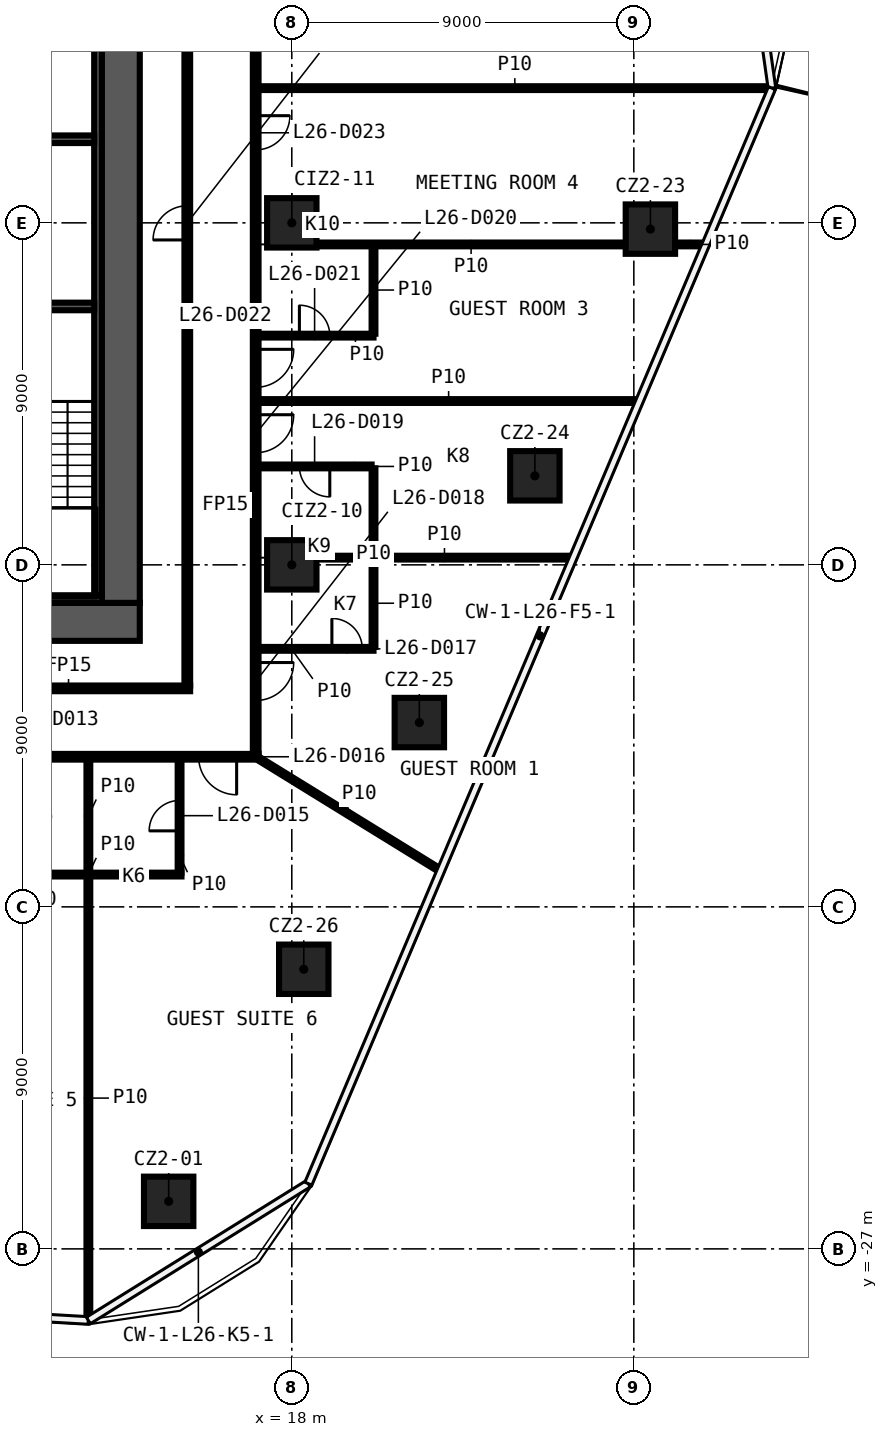
"""IFC4 building model, lengths in metres.
Left out: names, types, materials, properties, quantities, classifications, styles, units other than length and angle.
Written with IfcOpenShell. Run it as: python <this file> out.ifc"""

import sys

from ifc_helpers import new_model, si_unit, direction, frame, frame_2d, origin, origin_2d, place, context, subcontext, project, spatial, rectangle, extrude, element, fill, save


model = new_model("IFC4")
c1 = context("Model", 3, precision=1e-05, world=origin(), true_north=direction((0.0, 1.0)))
c2 = subcontext(c1, "Body", "Model", "MODEL_VIEW")
j1 = project(units=[si_unit("LENGTHUNIT", "METRE"), si_unit("PLANEANGLEUNIT", "RADIAN")], contexts=[c1])
p1 = place(None, origin())
s1 = spatial("IfcSite", under=j1, at=p1, CompositionType="ELEMENT")
p2 = place(p1, origin())
s2 = spatial("IfcBuilding", under=s1, at=p2, CompositionType="ELEMENT")
p3 = place(p2, frame((0.0, 0.0, 121.1)))
s3 = spatial("IfcBuildingStorey", under=s2, at=p3, CompositionType="ELEMENT", Elevation=121.1)
for number, where, z_axis, x_axis in (
    (1, (14.76, -25.749, 0.0), (0.0, 0.0, 1.0), (1.0, 0.0, 0.0)),
    (2, (27.436, -0.165, 0.0), (0.0, 0.0, 1.0), (1.0, 0.0, 0.0)),
    (3, (24.396, -6.657, 0.0), (0.0, 0.0, 1.0), (1.0, 0.0, 0.0)),
    (4, (21.356, -13.15, 0.0), (0.0, 0.0, 1.0), (1.0, 0.0, 0.0)),
    (5, (18.315, -19.642, 0.0), (0.0, 0.0, 1.0), (1.0, 0.0, 0.0)),
    (6, (18.0, -9.0, 0.0), (0.0, 0.0, 1.0), (1.0, 0.0, 0.0)),
    (7, (18.0, 0.0, 0.0), (0.0, 0.0, 1.0), (1.0, 0.0, 0.0)),
):
    element("IfcColumn", number, at=place(p3, frame(where, z_axis=z_axis, x_axis=x_axis)), inside=s3, PredefinedType="COLUMN", context=c2, shape_type="SweptSolid", body=[
        extrude(rectangle(XDim=1.3, YDim=1.3, at=origin_2d()), origin(), (0.0, 0.0, 1.0), 3.3),
    ])
p4 = place(p3, frame((10.197, -17.15, 0.0), z_axis=(0.0, 0.0, 1.0), x_axis=(1.0, 0.0, 0.0)))
e8 = element("IfcWall", 8, at=p4, inside=s3, PredefinedType="PARTITIONING", context=c2, shape_type="SweptSolid", body=[
    extrude(rectangle(XDim=4.9, YDim=0.1, at=frame_2d((2.45, 0.0))), origin(), (0.0, 0.0, 1.0), 3.3),
])
p5 = place(p3, frame((17.125, -14.05, 0.0), z_axis=(0.0, 0.0, 1.0), x_axis=(-1.0, 0.0, 0.0)))
e9 = element("IfcWall", 9, at=p5, inside=s3, PredefinedType="PARTITIONING", context=c2, shape_type="SweptSolid", body=[
    extrude(rectangle(XDim=34.25, YDim=0.15, at=frame_2d((17.125, 0.0))), origin(), (0.0, 0.0, 1.0), 3.3),
])
p6 = place(p5, frame((32.089, 0.0, 0.0)))
e10 = element("IfcOpeningElement", 10, at=p6, cuts=e9, PredefinedType="OPENING", context=c2, shape_type="SweptSolid", body=[
    extrude(rectangle(XDim=0.9, YDim=2.1, at=frame_2d((0.45, 1.05))), frame((0.0, 0.085, 0.0), z_axis=(0.0, -1.0, 0.0), x_axis=(1.0, 0.0, 0.0)), (0.0, 0.0, 1.0), 0.17),
])
p7 = place(p5, frame((25.666, 0.0, 0.0)))
e11 = element("IfcOpeningElement", 11, at=p7, cuts=e9, PredefinedType="OPENING", context=c2, shape_type="SweptSolid", body=[
    extrude(rectangle(XDim=1.0, YDim=2.1, at=frame_2d((0.5, 1.05))), frame((0.0, 0.085, 0.0), z_axis=(0.0, -1.0, 0.0), x_axis=(1.0, 0.0, 0.0)), (0.0, 0.0, 1.0), 0.17),
])
p8 = place(p5, frame((18.714, 0.0, 0.0)))
e12 = element("IfcOpeningElement", 12, at=p8, cuts=e9, PredefinedType="OPENING", context=c2, shape_type="SweptSolid", body=[
    extrude(rectangle(XDim=1.0, YDim=2.1, at=frame_2d((0.5, 1.05))), frame((0.0, 0.085, 0.0), z_axis=(0.0, -1.0, 0.0), x_axis=(1.0, 0.0, 0.0)), (0.0, 0.0, 1.0), 0.17),
])
p9 = place(p5, frame((16.558, 0.0, 0.0)))
e13 = element("IfcOpeningElement", 13, at=p9, cuts=e9, PredefinedType="OPENING", context=c2, shape_type="SweptSolid", body=[
    extrude(rectangle(XDim=1.0, YDim=2.1, at=frame_2d((0.5, 1.05))), frame((0.0, 0.085, 0.0), z_axis=(0.0, -1.0, 0.0), x_axis=(1.0, 0.0, 0.0)), (0.0, 0.0, 1.0), 0.17),
])
p10 = place(p5, frame((9.602, 0.0, 0.0)))
e14 = element("IfcOpeningElement", 14, at=p10, cuts=e9, PredefinedType="OPENING", context=c2, shape_type="SweptSolid", body=[
    extrude(rectangle(XDim=1.0, YDim=2.1, at=frame_2d((0.5, 1.05))), frame((0.0, 0.085, 0.0), z_axis=(0.0, -1.0, 0.0), x_axis=(1.0, 0.0, 0.0)), (0.0, 0.0, 1.0), 0.17),
])
p11 = place(p5, frame((7.451, 0.0, 0.0)))
e15 = element("IfcOpeningElement", 15, at=p11, cuts=e9, PredefinedType="OPENING", context=c2, shape_type="SweptSolid", body=[
    extrude(rectangle(XDim=1.0, YDim=2.1, at=frame_2d((0.5, 1.05))), frame((0.0, 0.085, 0.0), z_axis=(0.0, -1.0, 0.0), x_axis=(1.0, 0.0, 0.0)), (0.0, 0.0, 1.0), 0.17),
])
p12 = place(p5, frame((0.576, 0.0, 0.0)))
e16 = element("IfcOpeningElement", 16, at=p12, cuts=e9, PredefinedType="OPENING", context=c2, shape_type="SweptSolid", body=[
    extrude(rectangle(XDim=1.0, YDim=2.1, at=frame_2d((0.5, 1.05))), frame((0.0, 0.085, 0.0), z_axis=(0.0, -1.0, 0.0), x_axis=(1.0, 0.0, 0.0)), (0.0, 0.0, 1.0), 0.17),
])
p13 = place(p3, frame((8.925, -12.25, 0.0), z_axis=(0.0, 0.0, 1.0), x_axis=(1.0, 0.0, 0.0)))
e17 = element("IfcWall", 17, at=p13, inside=s3, PredefinedType="PARTITIONING", context=c2, shape_type="SweptSolid", body=[
    extrude(rectangle(XDim=6.4, YDim=0.15, at=frame_2d((3.2, 0.0))), origin(), (0.0, 0.0, 1.0), 3.3),
])
p14 = place(p3, frame((17.125, -11.21, 0.0), z_axis=(0.0, 0.0, 1.0), x_axis=(1.0, 0.0, 0.0)))
e18 = element("IfcWall", 18, at=p14, inside=s3, PredefinedType="PARTITIONING", context=c2, shape_type="SweptSolid", body=[
    extrude(rectangle(XDim=3.025, YDim=0.1, at=frame_2d((1.512, 0.0))), origin(), (0.0, 0.0, 1.0), 3.3),
])
p15 = place(p14, frame((1.93, 0.0, 0.0)))
e19 = element("IfcOpeningElement", 19, at=p15, cuts=e18, PredefinedType="OPENING", context=c2, shape_type="SweptSolid", body=[
    extrude(rectangle(XDim=0.8, YDim=2.1, at=frame_2d((0.4, 1.05))), frame((0.0, 0.06, 0.0), z_axis=(0.0, -1.0, 0.0), x_axis=(1.0, 0.0, 0.0)), (0.0, 0.0, 1.0), 0.12),
])
p16 = place(p3, frame((18.65, -8.81, 0.0), z_axis=(0.0, 0.0, 1.0), x_axis=(1.0, 0.0, 0.0)))
e20 = element("IfcWall", 20, at=p16, inside=s3, PredefinedType="PARTITIONING", context=c2, shape_type="SweptSolid", body=[
    extrude(rectangle(XDim=6.735, YDim=0.1, at=frame_2d((3.367, 0.0))), origin(), (0.0, 0.0, 1.0), 3.3),
])
p17 = place(p3, frame((20.1, -6.41, 0.0), z_axis=(0.0, 0.0, 1.0), x_axis=(-1.0, 0.0, 0.0)))
e21 = element("IfcWall", 21, at=p17, inside=s3, PredefinedType="PARTITIONING", context=c2, shape_type="SweptSolid", body=[
    extrude(rectangle(XDim=2.975, YDim=0.1, at=frame_2d((1.488, 0.0))), origin(), (0.0, 0.0, 1.0), 3.3),
])
p18 = place(p17, frame((1.1, 0.0, 0.0)))
e22 = element("IfcOpeningElement", 22, at=p18, cuts=e21, PredefinedType="OPENING", context=c2, shape_type="SweptSolid", body=[
    extrude(rectangle(XDim=0.8, YDim=2.1, at=frame_2d((0.4, 1.05))), frame((0.0, 0.06, 0.0), z_axis=(0.0, -1.0, 0.0), x_axis=(1.0, 0.0, 0.0)), (0.0, 0.0, 1.0), 0.12),
])
p19 = place(p3, frame((17.125, -4.689, 0.0), z_axis=(0.0, 0.0, 1.0), x_axis=(1.0, 0.0, 0.0)))
e23 = element("IfcWall", 23, at=p19, inside=s3, PredefinedType="PARTITIONING", context=c2, shape_type="SweptSolid", body=[
    extrude(rectangle(XDim=10.003, YDim=0.1, at=frame_2d((5.001, 0.0))), origin(), (0.0, 0.0, 1.0), 3.3),
])
p20 = place(p3, frame((17.125, -2.968, 0.0), z_axis=(0.0, 0.0, 1.0), x_axis=(1.0, 0.0, 0.0)))
e24 = element("IfcWall", 24, at=p20, inside=s3, PredefinedType="PARTITIONING", context=c2, shape_type="SweptSolid", body=[
    extrude(rectangle(XDim=3.025, YDim=0.1, at=frame_2d((1.512, 0.0))), origin(), (0.0, 0.0, 1.0), 3.3),
])
p21 = place(p20, frame((1.075, 0.0, 0.0)))
e25 = element("IfcOpeningElement", 25, at=p21, cuts=e24, PredefinedType="OPENING", context=c2, shape_type="SweptSolid", body=[
    extrude(rectangle(XDim=0.8, YDim=2.1, at=frame_2d((0.4, 1.05))), frame((0.0, 0.06, 0.0), z_axis=(0.0, -1.0, 0.0), x_axis=(1.0, 0.0, 0.0)), (0.0, 0.0, 1.0), 0.12),
])
p22 = place(p3, frame((18.65, -0.568, 0.0), z_axis=(0.0, 0.0, 1.0), x_axis=(1.0, 0.0, 0.0)))
e26 = element("IfcWall", 26, at=p22, inside=s3, PredefinedType="PARTITIONING", context=c2, shape_type="SweptSolid", body=[
    extrude(rectangle(XDim=8.136, YDim=0.1, at=frame_2d((4.068, 0.0))), origin(), (0.0, 0.0, 1.0), 3.3),
])
p23 = place(p3, frame((28.086, -0.568, 0.0), z_axis=(0.0, 0.0, 1.0), x_axis=(1.0, 0.0, 0.0)))
e27 = element("IfcWall", 27, at=p23, inside=s3, PredefinedType="PARTITIONING", context=c2, shape_type="SweptSolid", body=[
    extrude(rectangle(XDim=0.786, YDim=0.1, at=frame_2d((0.393, 0.0))), origin(), (0.0, 0.0, 1.0), 3.3),
])
p24 = place(p3, frame((17.125, 3.545, 0.0), z_axis=(0.0, 0.0, 1.0), x_axis=(1.0, 0.0, 0.0)))
e28 = element("IfcWall", 28, at=p24, inside=s3, PredefinedType="PARTITIONING", context=c2, shape_type="SweptSolid", body=[
    extrude(rectangle(XDim=13.487, YDim=0.1, at=frame_2d((6.743, 0.0))), origin(), (0.0, 0.0, 1.0), 3.3),
])
p25 = place(p3, frame((20.15, -11.16, 0.0), z_axis=(0.0, 0.0, 1.0), x_axis=(0.0, 1.0, 0.0)))
e29 = element("IfcWall", 29, at=p25, inside=s3, PredefinedType="PARTITIONING", context=c2, shape_type="SweptSolid", body=[
    extrude(rectangle(XDim=2.3, YDim=0.1, at=frame_2d((1.15, 0.0))), origin(), (0.0, 0.0, 1.0), 3.3),
])
p26 = place(p3, frame((20.15, -8.76, 0.0), z_axis=(0.0, 0.0, 1.0), x_axis=(0.0, 1.0, 0.0)))
e30 = element("IfcWall", 30, at=p26, inside=s3, PredefinedType="PARTITIONING", context=c2, shape_type="SweptSolid", body=[
    extrude(rectangle(XDim=2.3, YDim=0.1, at=frame_2d((1.15, 0.0))), origin(), (0.0, 0.0, 1.0), 3.3),
])
p27 = place(p3, frame((20.15, -2.918, 0.0), z_axis=(0.0, 0.0, 1.0), x_axis=(0.0, 1.0, 0.0)))
e31 = element("IfcWall", 31, at=p27, inside=s3, PredefinedType="PARTITIONING", context=c2, shape_type="SweptSolid", body=[
    extrude(rectangle(XDim=2.3, YDim=0.1, at=frame_2d((1.15, 0.0))), origin(), (0.0, 0.0, 1.0), 3.3),
])
p28 = place(p3, frame((17.05, 13.975, 0.0), z_axis=(0.0, 0.0, 1.0), x_axis=(0.0, -1.0, 0.0)))
e32 = element("IfcWall", 32, at=p28, inside=s3, PredefinedType="PARTITIONING", context=c2, shape_type="SweptSolid", body=[
    extrude(rectangle(XDim=27.95, YDim=0.15, at=frame_2d((13.975, 0.0))), origin(), (0.0, 0.0, 1.0), 3.3),
])
p29 = place(p28, frame((25.545, 0.0, 0.0)))
e33 = element("IfcOpeningElement", 33, at=p29, cuts=e32, PredefinedType="OPENING", context=c2, shape_type="SweptSolid", body=[
    extrude(rectangle(XDim=1.0, YDim=2.1, at=frame_2d((0.5, 1.05))), frame((0.0, 0.085, 0.0), z_axis=(0.0, -1.0, 0.0), x_axis=(1.0, 0.0, 0.0)), (0.0, 0.0, 1.0), 0.17),
])
p30 = place(p28, frame((19.024, 0.0, 0.0)))
e34 = element("IfcOpeningElement", 34, at=p30, cuts=e32, PredefinedType="OPENING", context=c2, shape_type="SweptSolid", body=[
    extrude(rectangle(XDim=1.0, YDim=2.1, at=frame_2d((0.5, 1.05))), frame((0.0, 0.085, 0.0), z_axis=(0.0, -1.0, 0.0), x_axis=(1.0, 0.0, 0.0)), (0.0, 0.0, 1.0), 0.17),
])
p31 = place(p28, frame((17.303, 0.0, 0.0)))
e35 = element("IfcOpeningElement", 35, at=p31, cuts=e32, PredefinedType="OPENING", context=c2, shape_type="SweptSolid", body=[
    extrude(rectangle(XDim=1.0, YDim=2.1, at=frame_2d((0.5, 1.05))), frame((0.0, 0.085, 0.0), z_axis=(0.0, -1.0, 0.0), x_axis=(1.0, 0.0, 0.0)), (0.0, 0.0, 1.0), 0.17),
])
p32 = place(p28, frame((11.155, 0.0, 0.0)))
e36 = element("IfcOpeningElement", 36, at=p32, cuts=e32, PredefinedType="OPENING", context=c2, shape_type="SweptSolid", body=[
    extrude(rectangle(XDim=0.9, YDim=2.1, at=frame_2d((0.45, 1.05))), frame((0.0, 0.085, 0.0), z_axis=(0.0, -1.0, 0.0), x_axis=(1.0, 0.0, 0.0)), (0.0, 0.0, 1.0), 0.17),
])
p33 = place(p28, frame((7.145, 0.0, 0.0)))
e37 = element("IfcOpeningElement", 37, at=p33, cuts=e32, PredefinedType="OPENING", context=c2, shape_type="SweptSolid", body=[
    extrude(rectangle(XDim=0.9, YDim=2.1, at=frame_2d((0.45, 1.05))), frame((0.0, 0.085, 0.0), z_axis=(0.0, -1.0, 0.0), x_axis=(1.0, 0.0, 0.0)), (0.0, 0.0, 1.0), 0.17),
])
p34 = place(p28, frame((2.168, 0.0, 0.0)))
e38 = element("IfcOpeningElement", 38, at=p34, cuts=e32, PredefinedType="OPENING", context=c2, shape_type="SweptSolid", body=[
    extrude(rectangle(XDim=0.9, YDim=2.1, at=frame_2d((0.45, 1.05))), frame((0.0, 0.085, 0.0), z_axis=(0.0, -1.0, 0.0), x_axis=(1.0, 0.0, 0.0)), (0.0, 0.0, 1.0), 0.17),
])
p35 = place(p3, frame((15.25, -12.175, 0.0), z_axis=(0.0, 0.0, 1.0), x_axis=(0.0, 1.0, 0.0)))
e39 = element("IfcWall", 39, at=p35, inside=s3, PredefinedType="PARTITIONING", context=c2, shape_type="SweptSolid", body=[
    extrude(rectangle(XDim=24.35, YDim=0.15, at=frame_2d((12.175, 0.0))), origin(), (0.0, 0.0, 1.0), 3.3),
])
p36 = place(p35, frame((11.725, 0.0, 0.0)))
e40 = element("IfcOpeningElement", 40, at=p36, cuts=e39, PredefinedType="OPENING", context=c2, shape_type="SweptSolid", body=[
    extrude(rectangle(XDim=0.9, YDim=2.1, at=frame_2d((0.45, 1.05))), frame((0.0, 0.085, 0.0), z_axis=(0.0, -1.0, 0.0), x_axis=(1.0, 0.0, 0.0)), (0.0, 0.0, 1.0), 0.17),
])
p37 = place(p3, frame((15.047, -17.1, 0.0), z_axis=(0.0, 0.0, 1.0), x_axis=(0.0, 1.0, 0.0)))
e41 = element("IfcWall", 41, at=p37, inside=s3, PredefinedType="PARTITIONING", context=c2, shape_type="SweptSolid", body=[
    extrude(rectangle(XDim=2.975, YDim=0.1, at=frame_2d((1.488, 0.0))), origin(), (0.0, 0.0, 1.0), 3.3),
])
p38 = place(p37, frame((1.1, 0.0, 0.0)))
e42 = element("IfcOpeningElement", 42, at=p38, cuts=e41, PredefinedType="OPENING", context=c2, shape_type="SweptSolid", body=[
    extrude(rectangle(XDim=0.8, YDim=2.1, at=frame_2d((0.4, 1.05))), frame((0.0, 0.06, 0.0), z_axis=(0.0, -1.0, 0.0), x_axis=(1.0, 0.0, 0.0)), (0.0, 0.0, 1.0), 0.12),
])
p39 = place(p3, frame((12.647, -28.864, 0.0), z_axis=(0.0, 0.0, 1.0), x_axis=(0.0, 1.0, 0.0)))
e43 = element("IfcWall", 43, at=p39, inside=s3, PredefinedType="PARTITIONING", context=c2, shape_type="SweptSolid", body=[
    extrude(rectangle(XDim=11.664, YDim=0.1, at=frame_2d((5.832, 0.0))), origin(), (0.0, 0.0, 1.0), 3.3),
])
p40 = place(p3, frame((12.647, -17.1, 0.0), z_axis=(0.0, 0.0, 1.0), x_axis=(0.0, 1.0, 0.0)))
e44 = element("IfcWall", 44, at=p40, inside=s3, PredefinedType="PARTITIONING", context=c2, shape_type="SweptSolid", body=[
    extrude(rectangle(XDim=2.975, YDim=0.1, at=frame_2d((1.488, 0.0))), origin(), (0.0, 0.0, 1.0), 3.3),
])
p41 = place(p3, frame((17.05, -14.05, 0.0), z_axis=(0.0, 0.0, 1.0), x_axis=(0.851278656023, -0.524713874221, 0.0)))
e45 = element("IfcWall", 45, at=p41, inside=s3, PredefinedType="PARTITIONING", context=c2, shape_type="SweptSolid", body=[
    extrude(rectangle(XDim=5.7, YDim=0.1, at=frame_2d((2.85, 0.0))), origin(), (0.0, 0.0, 1.0), 3.3),
])
p42 = place(p3, frame((14.0, -10.5, 0.0), z_axis=(0.0, 0.0, 1.0), x_axis=(-1.0, 0.0, 0.0)))
e46 = element("IfcWall", 46, at=p42, inside=s3, PredefinedType="SHEAR", context=c2, shape_type="SweptSolid", body=[
    extrude(rectangle(XDim=28.0, YDim=1.0, at=frame_2d((14.0, 0.0))), origin(), (0.0, 0.0, 1.0), 3.3),
])
p43 = place(p42, frame((5.1, 0.0, 0.0)))
e47 = element("IfcOpeningElement", 47, at=p43, cuts=e46, PredefinedType="OPENING", context=c2, shape_type="SweptSolid", body=[
    extrude(rectangle(XDim=1.6, YDim=2.1, at=frame_2d((0.8, 1.05))), frame((0.0, 0.51, 0.0), z_axis=(0.0, -1.0, 0.0), x_axis=(1.0, 0.0, 0.0)), (0.0, 0.0, 1.0), 1.02),
])
p44 = place(p3, frame((13.5, 10.0, 0.0), z_axis=(0.0, 0.0, 1.0), x_axis=(0.0, -1.0, 0.0)))
e48 = element("IfcWall", 48, at=p44, inside=s3, PredefinedType="SHEAR", context=c2, shape_type="SweptSolid", body=[
    extrude(rectangle(XDim=20.0, YDim=1.0, at=frame_2d((10.0, 0.0))), origin(), (0.0, 0.0, 1.0), 3.3),
])
p45 = place(p3, frame((13.0, -9.9, 0.0), z_axis=(0.0, 0.0, 1.0), x_axis=(-1.0, 0.0, 0.0)))
e49 = element("IfcWall", 49, at=p45, inside=s3, PredefinedType="SHEAR", context=c2, shape_type="SweptSolid", body=[
    extrude(rectangle(XDim=3.7, YDim=0.2, at=frame_2d((1.85, 0.0))), origin(), (0.0, 0.0, 1.0), 3.3),
])
p46 = place(p3, frame((12.9, 9.8, 0.0), z_axis=(0.0, 0.0, 1.0), x_axis=(0.0, -1.0, 0.0)))
e50 = element("IfcWall", 50, at=p46, inside=s3, PredefinedType="SHEAR", context=c2, shape_type="SweptSolid", body=[
    extrude(rectangle(XDim=19.6, YDim=0.2, at=frame_2d((9.8, 0.0))), origin(), (0.0, 0.0, 1.0), 3.3),
])
for number, where, z_axis, x_axis in (
    (51, (9.45, 2.2, 0.0), (0.0, 0.0, 1.0), (1.0, 0.0, 0.0)),
    (52, (9.45, -2.2, 0.0), (0.0, 0.0, 1.0), (1.0, 0.0, 0.0)),
):
    element("IfcWall", number, at=place(p3, frame(where, z_axis=z_axis, x_axis=x_axis)), inside=s3, PredefinedType="SHEAR", context=c2, shape_type="SweptSolid", body=[
        extrude(rectangle(XDim=3.35, YDim=0.2, at=frame_2d((1.675, 0.0))), origin(), (0.0, 0.0, 1.0), 3.3),
    ])
p47 = place(p38, origin())
e53 = element("IfcDoor", 53, at=p47, inside=s3, OperationType="SINGLE_SWING_LEFT", PredefinedType="DOOR", context=c2, shape_type="SweptSolid", body=[
    extrude(rectangle(XDim=0.8, YDim=2.1, at=frame_2d((0.4, 1.05))), frame((0.0, 0.025, 0.0), z_axis=(0.0, -1.0, 0.0), x_axis=(1.0, 0.0, 0.0)), (0.0, 0.0, 1.0), 0.05),
])
fill(e42, e53)
p48 = place(p12, origin())
e54 = element("IfcDoor", 54, at=p48, inside=s3, OperationType="SINGLE_SWING_RIGHT", PredefinedType="DOOR", context=c2, shape_type="SweptSolid", body=[
    extrude(rectangle(XDim=1.0, YDim=2.1, at=frame_2d((0.5, 1.05))), frame((0.0, 0.025, 0.0), z_axis=(0.0, -1.0, 0.0), x_axis=(1.0, 0.0, 0.0)), (0.0, 0.0, 1.0), 0.05),
])
fill(e16, e54)
p49 = place(p15, origin())
e55 = element("IfcDoor", 55, at=p49, inside=s3, OperationType="SINGLE_SWING_RIGHT", PredefinedType="DOOR", context=c2, shape_type="SweptSolid", body=[
    extrude(rectangle(XDim=0.8, YDim=2.1, at=frame_2d((0.4, 1.05))), frame((0.0, 0.025, 0.0), z_axis=(0.0, -1.0, 0.0), x_axis=(1.0, 0.0, 0.0)), (0.0, 0.0, 1.0), 0.05),
])
fill(e19, e55)
p50 = place(p29, origin())
e56 = element("IfcDoor", 56, at=p50, inside=s3, OperationType="SINGLE_SWING_LEFT", PredefinedType="DOOR", context=c2, shape_type="SweptSolid", body=[
    extrude(rectangle(XDim=1.0, YDim=2.1, at=frame_2d((0.5, 1.05))), frame((0.0, 0.025, 0.0), z_axis=(0.0, -1.0, 0.0), x_axis=(1.0, 0.0, 0.0)), (0.0, 0.0, 1.0), 0.05),
])
fill(e33, e56)
p51 = place(p18, origin())
e57 = element("IfcDoor", 57, at=p51, inside=s3, OperationType="SINGLE_SWING_LEFT", PredefinedType="DOOR", context=c2, shape_type="SweptSolid", body=[
    extrude(rectangle(XDim=0.8, YDim=2.1, at=frame_2d((0.4, 1.05))), frame((0.0, 0.025, 0.0), z_axis=(0.0, -1.0, 0.0), x_axis=(1.0, 0.0, 0.0)), (0.0, 0.0, 1.0), 0.05),
])
fill(e22, e57)
p52 = place(p30, origin())
e58 = element("IfcDoor", 58, at=p52, inside=s3, OperationType="SINGLE_SWING_RIGHT", PredefinedType="DOOR", context=c2, shape_type="SweptSolid", body=[
    extrude(rectangle(XDim=1.0, YDim=2.1, at=frame_2d((0.5, 1.05))), frame((0.0, 0.025, 0.0), z_axis=(0.0, -1.0, 0.0), x_axis=(1.0, 0.0, 0.0)), (0.0, 0.0, 1.0), 0.05),
])
fill(e34, e58)
p53 = place(p21, origin())
e59 = element("IfcDoor", 59, at=p53, inside=s3, OperationType="SINGLE_SWING_RIGHT", PredefinedType="DOOR", context=c2, shape_type="SweptSolid", body=[
    extrude(rectangle(XDim=0.8, YDim=2.1, at=frame_2d((0.4, 1.05))), frame((0.0, 0.025, 0.0), z_axis=(0.0, -1.0, 0.0), x_axis=(1.0, 0.0, 0.0)), (0.0, 0.0, 1.0), 0.05),
])
fill(e25, e59)
p54 = place(p31, origin())
e60 = element("IfcDoor", 60, at=p54, inside=s3, OperationType="SINGLE_SWING_LEFT", PredefinedType="DOOR", context=c2, shape_type="SweptSolid", body=[
    extrude(rectangle(XDim=1.0, YDim=2.1, at=frame_2d((0.5, 1.05))), frame((0.0, 0.025, 0.0), z_axis=(0.0, -1.0, 0.0), x_axis=(1.0, 0.0, 0.0)), (0.0, 0.0, 1.0), 0.05),
])
fill(e35, e60)
p55 = place(p32, origin())
e61 = element("IfcDoor", 61, at=p55, inside=s3, OperationType="SINGLE_SWING_RIGHT", PredefinedType="DOOR", context=c2, shape_type="SweptSolid", body=[
    extrude(rectangle(XDim=0.9, YDim=2.1, at=frame_2d((0.45, 1.05))), frame((0.0, 0.025, 0.0), z_axis=(0.0, -1.0, 0.0), x_axis=(1.0, 0.0, 0.0)), (0.0, 0.0, 1.0), 0.05),
])
fill(e36, e61)
p56 = place(p36, origin())
e62 = element("IfcDoor", 62, at=p56, inside=s3, OperationType="SINGLE_SWING_RIGHT", PredefinedType="DOOR", context=c2, shape_type="SweptSolid", body=[
    extrude(rectangle(XDim=0.9, YDim=2.1, at=frame_2d((0.45, 1.05))), frame((0.0, 0.025, 0.0), z_axis=(0.0, -1.0, 0.0), x_axis=(1.0, 0.0, 0.0)), (0.0, 0.0, 1.0), 0.05),
])
fill(e40, e62)
save(model, sys.argv[1])
